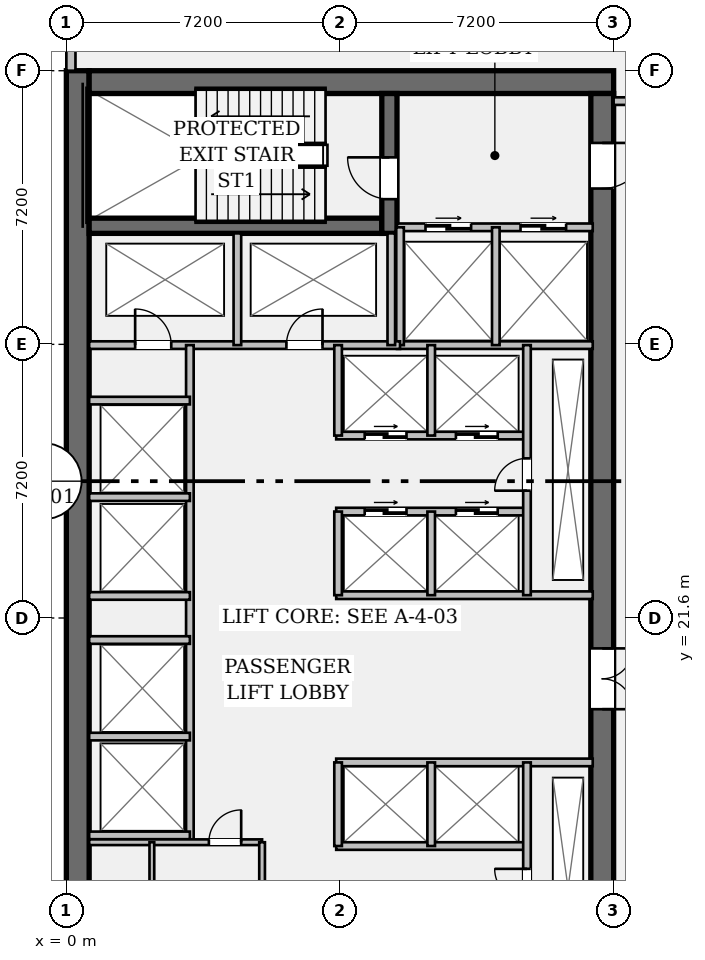
"""IFC4 building model, lengths in metres.
Left out: names, types, materials, properties, quantities, classifications, styles, units other than length and angle.
Written with IfcOpenShell. Run it as: python <this file> out.ifc"""

import sys

from ifc_helpers import new_model, si_unit, direction, frame, frame_2d, origin, place, context, subcontext, project, spatial, rectangle, extrude, element, fill, save


model = new_model("IFC4")
c1 = context("Model", 3, precision=1e-05, world=origin(), true_north=direction((0.0, 1.0)))
c2 = subcontext(c1, "Body", "Model", "MODEL_VIEW")
j1 = project(units=[si_unit("LENGTHUNIT", "METRE"), si_unit("PLANEANGLEUNIT", "RADIAN")], contexts=[c1])
p1 = place(None, origin())
s1 = spatial("IfcSite", under=j1, at=p1, CompositionType="ELEMENT")
p2 = place(p1, origin())
s2 = spatial("IfcBuilding", under=s1, at=p2, CompositionType="ELEMENT")
p3 = place(p2, frame((0.0, 0.0, 26.25)))
s3 = spatial("IfcBuildingStorey", under=s2, at=p3, CompositionType="ELEMENT", Elevation=26.25)
p4 = place(p3, frame((0.3, 7.2, 0.0), z_axis=(0.0, 0.0, 1.0), x_axis=(0.0, 1.0, 0.0)))
e1 = element("IfcWall", 1, at=p4, inside=s3, PredefinedType="SHEAR", context=c2, shape_type="SweptSolid", body=[
    extrude(rectangle(XDim=28.8, YDim=0.6, at=frame_2d((14.4, 0.0))), origin(), (0.0, 0.0, 1.0), 4.62),
])
p5 = place(p3, frame((0.6, 35.7, 0.0), z_axis=(0.0, 0.0, 1.0), x_axis=(1.0, 0.0, 0.0)))
e2 = element("IfcWall", 2, at=p5, inside=s3, PredefinedType="SHEAR", context=c2, shape_type="SweptSolid", body=[
    extrude(rectangle(XDim=13.8, YDim=0.6, at=frame_2d((6.9, 0.0))), origin(), (0.0, 0.0, 1.0), 4.62),
])
p6 = place(p3, frame((14.1, 35.4, 0.0), z_axis=(0.0, 0.0, 1.0), x_axis=(0.0, -1.0, 0.0)))
e3 = element("IfcWall", 3, at=p6, inside=s3, PredefinedType="SHEAR", context=c2, shape_type="SweptSolid", body=[
    extrude(rectangle(XDim=27.6, YDim=0.6, at=frame_2d((13.8, 0.0))), origin(), (0.0, 0.0, 1.0), 4.62),
])
p7 = place(p6, frame((1.3, 0.0, 0.0)))
e4 = element("IfcOpeningElement", 4, at=p7, cuts=e3, PredefinedType="OPENING", context=c2, shape_type="SweptSolid", body=[
    extrude(rectangle(XDim=1.2, YDim=2.15, at=frame_2d((0.6, 1.075))), frame((0.0, 0.312, 0.0), z_axis=(0.0, -1.0, 0.0), x_axis=(1.0, 0.0, 0.0)), (0.0, 0.0, 1.0), 0.624),
])
p8 = place(p6, frame((25.25, 0.0, 0.0)))
e5 = element("IfcOpeningElement", 5, at=p8, cuts=e3, PredefinedType="OPENING", context=c2, shape_type="SweptSolid", body=[
    extrude(rectangle(XDim=1.2, YDim=2.15, at=frame_2d((0.6, 1.075))), frame((0.0, 0.312, 0.0), z_axis=(0.0, -1.0, 0.0), x_axis=(1.0, 0.0, 0.0)), (0.0, 0.0, 1.0), 0.624),
])
p9 = place(p6, frame((14.6, 0.0, 0.0)))
e6 = element("IfcOpeningElement", 6, at=p9, cuts=e3, PredefinedType="OPENING", context=c2, shape_type="SweptSolid", body=[
    extrude(rectangle(XDim=1.6, YDim=2.2, at=frame_2d((0.8, 1.1))), frame((0.0, 0.312, 0.0), z_axis=(0.0, -1.0, 0.0), x_axis=(1.0, 0.0, 0.0)), (0.0, 0.0, 1.0), 0.624),
])
p10 = place(p3, frame((0.6, 31.92, 0.0), z_axis=(0.0, 0.0, 1.0), x_axis=(1.0, 0.0, 0.0)))
e7 = element("IfcWall", 7, at=p10, inside=s3, PredefinedType="SHEAR", context=c2, shape_type="SweptSolid", body=[
    extrude(rectangle(XDim=7.7, YDim=0.4, at=frame_2d((3.85, 0.0))), origin(), (0.0, 0.0, 1.0), 4.62),
])
p11 = place(p3, frame((8.5, 31.72, 0.0), z_axis=(0.0, 0.0, 1.0), x_axis=(0.0, 1.0, 0.0)))
e8 = element("IfcWall", 8, at=p11, inside=s3, PredefinedType="SHEAR", context=c2, shape_type="SweptSolid", body=[
    extrude(rectangle(XDim=3.68, YDim=0.4, at=frame_2d((1.84, 0.0))), origin(), (0.0, 0.0, 1.0), 4.62),
])
p12 = place(p11, frame((0.9, 0.0, 0.0)))
e9 = element("IfcOpeningElement", 9, at=p12, cuts=e8, PredefinedType="OPENING", context=c2, shape_type="SweptSolid", body=[
    extrude(rectangle(XDim=1.1, YDim=2.15, at=frame_2d((0.55, 1.075))), frame((0.0, 0.212, 0.0), z_axis=(0.0, -1.0, 0.0), x_axis=(1.0, 0.0, 0.0)), (0.0, 0.0, 1.0), 0.424),
])
p13 = place(p3, frame((0.12, 36.0, 0.0), z_axis=(0.0, 0.0, 1.0), x_axis=(0.0, 1.0, 0.0)))
e10 = element("IfcWall", 10, at=p13, inside=s3, PredefinedType="STANDARD", context=c2, shape_type="SweptSolid", body=[
    extrude(rectangle(XDim=4.38, YDim=0.24, at=frame_2d((2.19, 0.0))), origin(), (0.0, 0.0, 1.0), 4.62),
])
p14 = place(p3, frame((8.7, 31.88, 0.0), z_axis=(0.0, 0.0, 1.0), x_axis=(1.0, 0.0, 0.0)))
e11 = element("IfcWall", 11, at=p14, inside=s3, PredefinedType="PARTITIONING", context=c2, shape_type="SweptSolid", body=[
    extrude(rectangle(XDim=5.15, YDim=0.2, at=frame_2d((2.575, 0.0))), origin(), (0.0, 0.0, 1.0), 4.62),
])
p15 = place(p14, frame((0.75, 0.0, 0.0)))
e12 = element("IfcOpeningElement", 12, at=p15, cuts=e11, PredefinedType="OPENING", context=c2, shape_type="SweptSolid", body=[
    extrude(rectangle(XDim=1.2, YDim=2.2, at=frame_2d((0.6, 1.1))), frame((0.0, 0.112, 0.0), z_axis=(0.0, -1.0, 0.0), x_axis=(1.0, 0.0, 0.0)), (0.0, 0.0, 1.0), 0.224),
])
p16 = place(p14, frame((3.25, 0.0, 0.0)))
e13 = element("IfcOpeningElement", 13, at=p16, cuts=e11, PredefinedType="OPENING", context=c2, shape_type="SweptSolid", body=[
    extrude(rectangle(XDim=1.2, YDim=2.2, at=frame_2d((0.6, 1.1))), frame((0.0, 0.112, 0.0), z_axis=(0.0, -1.0, 0.0), x_axis=(1.0, 0.0, 0.0)), (0.0, 0.0, 1.0), 0.224),
])
p17 = place(p3, frame((8.7, 28.78, 0.0), z_axis=(0.0, 0.0, 1.0), x_axis=(1.0, 0.0, 0.0)))
e14 = element("IfcWall", 14, at=p17, inside=s3, PredefinedType="PARTITIONING", context=c2, shape_type="SweptSolid", body=[
    extrude(rectangle(XDim=5.15, YDim=0.2, at=frame_2d((2.575, 0.0))), origin(), (0.0, 0.0, 1.0), 4.62),
])
for number, where, z_axis, x_axis in (
    (15, (8.78, 28.78, 0.0), (0.0, 0.0, 1.0), (0.0, 1.0, 0.0)),
    (16, (11.3, 28.78, 0.0), (0.0, 0.0, 1.0), (0.0, 1.0, 0.0)),
):
    element("IfcWall", number, at=place(p3, frame(where, z_axis=z_axis, x_axis=x_axis)), inside=s3, PredefinedType="PARTITIONING", context=c2, shape_type="SweptSolid", body=[
        extrude(rectangle(XDim=3.1, YDim=0.2, at=frame_2d((1.55, 0.0))), origin(), (0.0, 0.0, 1.0), 4.62),
    ])
p18 = place(p3, frame((0.6, 28.78, 0.0), z_axis=(0.0, 0.0, 1.0), x_axis=(1.0, 0.0, 0.0)))
e17 = element("IfcWall", 17, at=p18, inside=s3, PredefinedType="PARTITIONING", context=c2, shape_type="SweptSolid", body=[
    extrude(rectangle(XDim=8.18, YDim=0.2, at=frame_2d((4.09, 0.0))), origin(), (0.0, 0.0, 1.0), 4.62),
])
p19 = place(p18, frame((1.21, 0.0, 0.0)))
e18 = element("IfcOpeningElement", 18, at=p19, cuts=e17, PredefinedType="OPENING", context=c2, shape_type="SweptSolid", body=[
    extrude(rectangle(XDim=0.95, YDim=2.15, at=frame_2d((0.475, 1.075))), frame((0.0, 0.112, 0.0), z_axis=(0.0, -1.0, 0.0), x_axis=(1.0, 0.0, 0.0)), (0.0, 0.0, 1.0), 0.224),
])
p20 = place(p18, frame((5.19, 0.0, 0.0)))
e19 = element("IfcOpeningElement", 19, at=p20, cuts=e17, PredefinedType="OPENING", context=c2, shape_type="SweptSolid", body=[
    extrude(rectangle(XDim=0.95, YDim=2.15, at=frame_2d((0.475, 1.075))), frame((0.0, 0.112, 0.0), z_axis=(0.0, -1.0, 0.0), x_axis=(1.0, 0.0, 0.0)), (0.0, 0.0, 1.0), 0.224),
])
for number, where, z_axis, x_axis in (
    (20, (4.5, 28.78, 0.0), (0.0, 0.0, 1.0), (0.0, 1.0, 0.0)),
    (21, (8.55, 28.78, 0.0), (0.0, 0.0, 1.0), (0.0, 1.0, 0.0)),
):
    element("IfcWall", number, at=place(p3, frame(where, z_axis=z_axis, x_axis=x_axis)), inside=s3, PredefinedType="PARTITIONING", context=c2, shape_type="SweptSolid", body=[
        extrude(rectangle(XDim=2.94, YDim=0.2, at=frame_2d((1.47, 0.0))), origin(), (0.0, 0.0, 1.0), 4.62),
    ])
p21 = place(p3, frame((3.25, 15.7, 0.0), z_axis=(0.0, 0.0, 1.0), x_axis=(0.0, 1.0, 0.0)))
e22 = element("IfcWall", 22, at=p21, inside=s3, PredefinedType="PARTITIONING", context=c2, shape_type="SweptSolid", body=[
    extrude(rectangle(XDim=13.08, YDim=0.2, at=frame_2d((6.54, 0.0))), origin(), (0.0, 0.0, 1.0), 4.62),
])
for number, where, z_axis, x_axis in (
    (23, (0.6, 15.88, 0.0), (0.0, 0.0, 1.0), (1.0, 0.0, 0.0)),
    (24, (0.6, 18.48, 0.0), (0.0, 0.0, 1.0), (1.0, 0.0, 0.0)),
    (25, (0.6, 22.18, 0.0), (0.0, 0.0, 1.0), (1.0, 0.0, 0.0)),
    (26, (0.6, 24.78, 0.0), (0.0, 0.0, 1.0), (1.0, 0.0, 0.0)),
    (27, (0.6, 21.02, 0.0), (0.0, 0.0, 1.0), (1.0, 0.0, 0.0)),
    (28, (0.6, 27.32, 0.0), (0.0, 0.0, 1.0), (1.0, 0.0, 0.0)),
):
    element("IfcWall", number, at=place(p3, frame(where, z_axis=z_axis, x_axis=x_axis)), inside=s3, PredefinedType="PARTITIONING", context=c2, shape_type="SweptSolid", body=[
        extrude(rectangle(XDim=2.65, YDim=0.2, at=frame_2d((1.325, 0.0))), origin(), (0.0, 0.0, 1.0), 4.62),
    ])
p22 = place(p3, frame((7.1, 22.2, 0.0), z_axis=(0.0, 0.0, 1.0), x_axis=(1.0, 0.0, 0.0)))
e29 = element("IfcWall", 29, at=p22, inside=s3, PredefinedType="PARTITIONING", context=c2, shape_type="SweptSolid", body=[
    extrude(rectangle(XDim=6.75, YDim=0.2, at=frame_2d((3.375, 0.0))), origin(), (0.0, 0.0, 1.0), 4.62),
])
p23 = place(p3, frame((7.1, 24.4, 0.0), z_axis=(0.0, 0.0, 1.0), x_axis=(1.0, 0.0, 0.0)))
e30 = element("IfcWall", 30, at=p23, inside=s3, PredefinedType="PARTITIONING", context=c2, shape_type="SweptSolid", body=[
    extrude(rectangle(XDim=5.02, YDim=0.2, at=frame_2d((2.51, 0.0))), origin(), (0.0, 0.0, 1.0), 4.62),
])
p24 = place(p23, frame((0.75, 0.0, 0.0)))
e31 = element("IfcOpeningElement", 31, at=p24, cuts=e30, PredefinedType="OPENING", context=c2, shape_type="SweptSolid", body=[
    extrude(rectangle(XDim=1.1, YDim=2.2, at=frame_2d((0.55, 1.1))), frame((0.0, 0.112, 0.0), z_axis=(0.0, -1.0, 0.0), x_axis=(1.0, 0.0, 0.0)), (0.0, 0.0, 1.0), 0.224),
])
p25 = place(p23, frame((3.15, 0.0, 0.0)))
e32 = element("IfcOpeningElement", 32, at=p25, cuts=e30, PredefinedType="OPENING", context=c2, shape_type="SweptSolid", body=[
    extrude(rectangle(XDim=1.1, YDim=2.2, at=frame_2d((0.55, 1.1))), frame((0.0, 0.112, 0.0), z_axis=(0.0, -1.0, 0.0), x_axis=(1.0, 0.0, 0.0)), (0.0, 0.0, 1.0), 0.224),
])
p26 = place(p3, frame((7.1, 26.4, 0.0), z_axis=(0.0, 0.0, 1.0), x_axis=(1.0, 0.0, 0.0)))
e33 = element("IfcWall", 33, at=p26, inside=s3, PredefinedType="PARTITIONING", context=c2, shape_type="SweptSolid", body=[
    extrude(rectangle(XDim=5.02, YDim=0.2, at=frame_2d((2.51, 0.0))), origin(), (0.0, 0.0, 1.0), 4.62),
])
p27 = place(p26, frame((0.75, 0.0, 0.0)))
e34 = element("IfcOpeningElement", 34, at=p27, cuts=e33, PredefinedType="OPENING", context=c2, shape_type="SweptSolid", body=[
    extrude(rectangle(XDim=1.1, YDim=2.2, at=frame_2d((0.55, 1.1))), frame((0.0, 0.112, 0.0), z_axis=(0.0, -1.0, 0.0), x_axis=(1.0, 0.0, 0.0)), (0.0, 0.0, 1.0), 0.224),
])
p28 = place(p26, frame((3.15, 0.0, 0.0)))
e35 = element("IfcOpeningElement", 35, at=p28, cuts=e33, PredefinedType="OPENING", context=c2, shape_type="SweptSolid", body=[
    extrude(rectangle(XDim=1.1, YDim=2.2, at=frame_2d((0.55, 1.1))), frame((0.0, 0.112, 0.0), z_axis=(0.0, -1.0, 0.0), x_axis=(1.0, 0.0, 0.0)), (0.0, 0.0, 1.0), 0.224),
])
p29 = place(p3, frame((7.15, 22.2, 0.0), z_axis=(0.0, 0.0, 1.0), x_axis=(0.0, 1.0, 0.0)))
e36 = element("IfcWall", 36, at=p29, inside=s3, PredefinedType="PARTITIONING", context=c2, shape_type="SweptSolid", body=[
    extrude(rectangle(XDim=2.2, YDim=0.2, at=frame_2d((1.1, 0.0))), origin(), (0.0, 0.0, 1.0), 4.62),
])
p30 = place(p3, frame((7.15, 26.4, 0.0), z_axis=(0.0, 0.0, 1.0), x_axis=(0.0, 1.0, 0.0)))
e37 = element("IfcWall", 37, at=p30, inside=s3, PredefinedType="PARTITIONING", context=c2, shape_type="SweptSolid", body=[
    extrude(rectangle(XDim=2.38, YDim=0.2, at=frame_2d((1.19, 0.0))), origin(), (0.0, 0.0, 1.0), 4.62),
])
p31 = place(p3, frame((9.6, 22.2, 0.0), z_axis=(0.0, 0.0, 1.0), x_axis=(0.0, 1.0, 0.0)))
e38 = element("IfcWall", 38, at=p31, inside=s3, PredefinedType="PARTITIONING", context=c2, shape_type="SweptSolid", body=[
    extrude(rectangle(XDim=2.2, YDim=0.2, at=frame_2d((1.1, 0.0))), origin(), (0.0, 0.0, 1.0), 4.62),
])
p32 = place(p3, frame((9.6, 26.4, 0.0), z_axis=(0.0, 0.0, 1.0), x_axis=(0.0, 1.0, 0.0)))
e39 = element("IfcWall", 39, at=p32, inside=s3, PredefinedType="PARTITIONING", context=c2, shape_type="SweptSolid", body=[
    extrude(rectangle(XDim=2.38, YDim=0.2, at=frame_2d((1.19, 0.0))), origin(), (0.0, 0.0, 1.0), 4.62),
])
p33 = place(p3, frame((12.12, 22.2, 0.0), z_axis=(0.0, 0.0, 1.0), x_axis=(0.0, 1.0, 0.0)))
e40 = element("IfcWall", 40, at=p33, inside=s3, PredefinedType="PARTITIONING", context=c2, shape_type="SweptSolid", body=[
    extrude(rectangle(XDim=6.58, YDim=0.2, at=frame_2d((3.29, 0.0))), origin(), (0.0, 0.0, 1.0), 4.62),
])
p34 = place(p33, frame((2.75, 0.0, 0.0)))
e41 = element("IfcOpeningElement", 41, at=p34, cuts=e40, PredefinedType="OPENING", context=c2, shape_type="SweptSolid", body=[
    extrude(rectangle(XDim=0.85, YDim=2.15, at=frame_2d((0.425, 1.075))), frame((0.0, 0.112, 0.0), z_axis=(0.0, -1.0, 0.0), x_axis=(1.0, 0.0, 0.0)), (0.0, 0.0, 1.0), 0.224),
])
p35 = place(p3, frame((7.1, 17.8, 0.0), z_axis=(0.0, 0.0, 1.0), x_axis=(1.0, 0.0, 0.0)))
e42 = element("IfcWall", 42, at=p35, inside=s3, PredefinedType="PARTITIONING", context=c2, shape_type="SweptSolid", body=[
    extrude(rectangle(XDim=6.75, YDim=0.2, at=frame_2d((3.375, 0.0))), origin(), (0.0, 0.0, 1.0), 4.62),
])
p36 = place(p3, frame((7.1, 15.6, 0.0), z_axis=(0.0, 0.0, 1.0), x_axis=(1.0, 0.0, 0.0)))
e43 = element("IfcWall", 43, at=p36, inside=s3, PredefinedType="PARTITIONING", context=c2, shape_type="SweptSolid", body=[
    extrude(rectangle(XDim=5.02, YDim=0.2, at=frame_2d((2.51, 0.0))), origin(), (0.0, 0.0, 1.0), 4.62),
])
for number, where, z_axis, x_axis in (
    (44, (7.15, 15.6, 0.0), (0.0, 0.0, 1.0), (0.0, 1.0, 0.0)),
    (45, (9.6, 15.6, 0.0), (0.0, 0.0, 1.0), (0.0, 1.0, 0.0)),
):
    element("IfcWall", number, at=place(p3, frame(where, z_axis=z_axis, x_axis=x_axis)), inside=s3, PredefinedType="PARTITIONING", context=c2, shape_type="SweptSolid", body=[
        extrude(rectangle(XDim=2.2, YDim=0.2, at=frame_2d((1.1, 0.0))), origin(), (0.0, 0.0, 1.0), 4.62),
    ])
p37 = place(p3, frame((12.12, 11.2, 0.0), z_axis=(0.0, 0.0, 1.0), x_axis=(0.0, 1.0, 0.0)))
e46 = element("IfcWall", 46, at=p37, inside=s3, PredefinedType="PARTITIONING", context=c2, shape_type="SweptSolid", body=[
    extrude(rectangle(XDim=6.6, YDim=0.2, at=frame_2d((3.3, 0.0))), origin(), (0.0, 0.0, 1.0), 4.62),
])
p38 = place(p37, frame((2.95, 0.0, 0.0)))
e47 = element("IfcOpeningElement", 47, at=p38, cuts=e46, PredefinedType="OPENING", context=c2, shape_type="SweptSolid", body=[
    extrude(rectangle(XDim=0.85, YDim=2.15, at=frame_2d((0.425, 1.075))), frame((0.0, 0.112, 0.0), z_axis=(0.0, -1.0, 0.0), x_axis=(1.0, 0.0, 0.0)), (0.0, 0.0, 1.0), 0.224),
])
p39 = place(p3, frame((0.6, 15.7, 0.0), z_axis=(0.0, 0.0, 1.0), x_axis=(1.0, 0.0, 0.0)))
e48 = element("IfcWall", 48, at=p39, inside=s3, PredefinedType="PARTITIONING", context=c2, shape_type="SweptSolid", body=[
    extrude(rectangle(XDim=4.55, YDim=0.15, at=frame_2d((2.275, 0.0))), origin(), (0.0, 0.0, 1.0), 4.62),
])
p40 = place(p39, frame((3.15, 0.0, 0.0)))
e49 = element("IfcOpeningElement", 49, at=p40, cuts=e48, PredefinedType="OPENING", context=c2, shape_type="SweptSolid", body=[
    extrude(rectangle(XDim=0.85, YDim=2.15, at=frame_2d((0.425, 1.075))), frame((0.0, 0.087, 0.0), z_axis=(0.0, -1.0, 0.0), x_axis=(1.0, 0.0, 0.0)), (0.0, 0.0, 1.0), 0.174),
])
p41 = place(p3, frame((5.15, 11.28, 0.0), z_axis=(0.0, 0.0, 1.0), x_axis=(0.0, 1.0, 0.0)))
e50 = element("IfcWall", 50, at=p41, inside=s3, PredefinedType="PARTITIONING", context=c2, shape_type="SweptSolid", body=[
    extrude(rectangle(XDim=4.42, YDim=0.15, at=frame_2d((2.21, 0.0))), origin(), (0.0, 0.0, 1.0), 4.62),
])
p42 = place(p3, frame((2.25, 11.28, 0.0), z_axis=(0.0, 0.0, 1.0), x_axis=(0.0, 1.0, 0.0)))
e51 = element("IfcWall", 51, at=p42, inside=s3, PredefinedType="PARTITIONING", context=c2, shape_type="SweptSolid", body=[
    extrude(rectangle(XDim=4.42, YDim=0.125, at=frame_2d((2.21, 0.0))), origin(), (0.0, 0.0, 1.0), 4.62),
])
p43 = place(p42, frame((1.65, 0.0, 0.0)))
e52 = element("IfcOpeningElement", 52, at=p43, cuts=e51, PredefinedType="OPENING", context=c2, shape_type="SweptSolid", body=[
    extrude(rectangle(XDim=0.85, YDim=2.15, at=frame_2d((0.425, 1.075))), frame((0.0, 0.074, 0.0), z_axis=(0.0, -1.0, 0.0), x_axis=(1.0, 0.0, 0.0)), (0.0, 0.0, 1.0), 0.149),
])
p44 = place(p3, frame((14.4, 35.2, 0.0), z_axis=(0.0, 0.0, 1.0), x_axis=(1.0, 0.0, 0.0)))
e53 = element("IfcWall", 53, at=p44, inside=s3, PredefinedType="PARTITIONING", context=c2, shape_type="SweptSolid", body=[
    extrude(rectangle(XDim=2.95, YDim=0.2, at=frame_2d((1.475, 0.0))), origin(), (0.0, 0.0, 1.0), 3.678),
])
p45 = place(p44, frame((0.9, 0.0, 0.0)))
e54 = element("IfcOpeningElement", 54, at=p45, cuts=e53, PredefinedType="OPENING", context=c2, shape_type="SweptSolid", body=[
    extrude(rectangle(XDim=1.0, YDim=2.15, at=frame_2d((0.5, 1.075))), frame((0.0, 0.112, 0.0), z_axis=(0.0, -1.0, 0.0), x_axis=(1.0, 0.0, 0.0)), (0.0, 0.0, 1.0), 0.224),
])
p46 = place(p12, origin())
e55 = element("IfcDoor", 55, at=p46, inside=s3, OperationType="SINGLE_SWING_RIGHT", PredefinedType="DOOR", context=c2, shape_type="SweptSolid", body=[
    extrude(rectangle(XDim=1.1, YDim=2.15, at=frame_2d((0.55, 1.075))), frame((0.0, 0.025, 0.0), z_axis=(0.0, -1.0, 0.0), x_axis=(1.0, 0.0, 0.0)), (0.0, 0.0, 1.0), 0.05),
])
fill(e9, e55)
p47 = place(p7, origin())
e56 = element("IfcDoor", 56, at=p47, inside=s3, OperationType="SINGLE_SWING_LEFT", PredefinedType="DOOR", context=c2, shape_type="SweptSolid", body=[
    extrude(rectangle(XDim=1.2, YDim=2.15, at=frame_2d((0.6, 1.075))), frame((0.0, 0.025, 0.0), z_axis=(0.0, -1.0, 0.0), x_axis=(1.0, 0.0, 0.0)), (0.0, 0.0, 1.0), 0.05),
])
fill(e4, e56)
p48 = place(p15, origin())
e57 = element("IfcDoor", 57, at=p48, inside=s3, OperationType="DOUBLE_DOOR_SLIDING", PredefinedType="DOOR", context=c2, shape_type="SweptSolid", body=[
    extrude(rectangle(XDim=1.2, YDim=2.2, at=frame_2d((0.6, 1.1))), frame((0.0, 0.025, 0.0), z_axis=(0.0, -1.0, 0.0), x_axis=(1.0, 0.0, 0.0)), (0.0, 0.0, 1.0), 0.05),
])
fill(e12, e57)
p49 = place(p16, origin())
e58 = element("IfcDoor", 58, at=p49, inside=s3, OperationType="DOUBLE_DOOR_SLIDING", PredefinedType="DOOR", context=c2, shape_type="SweptSolid", body=[
    extrude(rectangle(XDim=1.2, YDim=2.2, at=frame_2d((0.6, 1.1))), frame((0.0, 0.025, 0.0), z_axis=(0.0, -1.0, 0.0), x_axis=(1.0, 0.0, 0.0)), (0.0, 0.0, 1.0), 0.05),
])
fill(e13, e58)
p50 = place(p19, origin())
e59 = element("IfcDoor", 59, at=p50, inside=s3, OperationType="SINGLE_SWING_LEFT", PredefinedType="DOOR", context=c2, shape_type="SweptSolid", body=[
    extrude(rectangle(XDim=0.95, YDim=2.15, at=frame_2d((0.475, 1.075))), frame((0.0, 0.025, 0.0), z_axis=(0.0, -1.0, 0.0), x_axis=(1.0, 0.0, 0.0)), (0.0, 0.0, 1.0), 0.05),
])
fill(e18, e59)
p51 = place(p20, origin())
e60 = element("IfcDoor", 60, at=p51, inside=s3, OperationType="SINGLE_SWING_RIGHT", PredefinedType="DOOR", context=c2, shape_type="SweptSolid", body=[
    extrude(rectangle(XDim=0.95, YDim=2.15, at=frame_2d((0.475, 1.075))), frame((0.0, 0.025, 0.0), z_axis=(0.0, -1.0, 0.0), x_axis=(1.0, 0.0, 0.0)), (0.0, 0.0, 1.0), 0.05),
])
fill(e19, e60)
p52 = place(p9, origin())
e61 = element("IfcDoor", 61, at=p52, inside=s3, OperationType="DOUBLE_DOOR_SINGLE_SWING", PredefinedType="DOOR", context=c2, shape_type="SweptSolid", body=[
    extrude(rectangle(XDim=1.6, YDim=2.2, at=frame_2d((0.8, 1.1))), frame((0.0, 0.025, 0.0), z_axis=(0.0, -1.0, 0.0), x_axis=(1.0, 0.0, 0.0)), (0.0, 0.0, 1.0), 0.05),
])
fill(e6, e61)
p53 = place(p34, origin())
e62 = element("IfcDoor", 62, at=p53, inside=s3, OperationType="SINGLE_SWING_LEFT", PredefinedType="DOOR", context=c2, shape_type="SweptSolid", body=[
    extrude(rectangle(XDim=0.85, YDim=2.15, at=frame_2d((0.425, 1.075))), frame((0.0, 0.025, 0.0), z_axis=(0.0, -1.0, 0.0), x_axis=(1.0, 0.0, 0.0)), (0.0, 0.0, 1.0), 0.05),
])
fill(e41, e62)
p54 = place(p24, origin())
e63 = element("IfcDoor", 63, at=p54, inside=s3, OperationType="DOUBLE_DOOR_SLIDING", PredefinedType="DOOR", context=c2, shape_type="SweptSolid", body=[
    extrude(rectangle(XDim=1.1, YDim=2.2, at=frame_2d((0.55, 1.1))), frame((0.0, 0.025, 0.0), z_axis=(0.0, -1.0, 0.0), x_axis=(1.0, 0.0, 0.0)), (0.0, 0.0, 1.0), 0.05),
])
fill(e31, e63)
p55 = place(p25, origin())
e64 = element("IfcDoor", 64, at=p55, inside=s3, OperationType="DOUBLE_DOOR_SLIDING", PredefinedType="DOOR", context=c2, shape_type="SweptSolid", body=[
    extrude(rectangle(XDim=1.1, YDim=2.2, at=frame_2d((0.55, 1.1))), frame((0.0, 0.025, 0.0), z_axis=(0.0, -1.0, 0.0), x_axis=(1.0, 0.0, 0.0)), (0.0, 0.0, 1.0), 0.05),
])
fill(e32, e64)
p56 = place(p27, origin())
e65 = element("IfcDoor", 65, at=p56, inside=s3, OperationType="DOUBLE_DOOR_SLIDING", PredefinedType="DOOR", context=c2, shape_type="SweptSolid", body=[
    extrude(rectangle(XDim=1.1, YDim=2.2, at=frame_2d((0.55, 1.1))), frame((0.0, 0.025, 0.0), z_axis=(0.0, -1.0, 0.0), x_axis=(1.0, 0.0, 0.0)), (0.0, 0.0, 1.0), 0.05),
])
fill(e34, e65)
p57 = place(p28, origin())
e66 = element("IfcDoor", 66, at=p57, inside=s3, OperationType="DOUBLE_DOOR_SLIDING", PredefinedType="DOOR", context=c2, shape_type="SweptSolid", body=[
    extrude(rectangle(XDim=1.1, YDim=2.2, at=frame_2d((0.55, 1.1))), frame((0.0, 0.025, 0.0), z_axis=(0.0, -1.0, 0.0), x_axis=(1.0, 0.0, 0.0)), (0.0, 0.0, 1.0), 0.05),
])
fill(e35, e66)
p58 = place(p38, origin())
e67 = element("IfcDoor", 67, at=p58, inside=s3, OperationType="SINGLE_SWING_RIGHT", PredefinedType="DOOR", context=c2, shape_type="SweptSolid", body=[
    extrude(rectangle(XDim=0.85, YDim=2.15, at=frame_2d((0.425, 1.075))), frame((0.0, 0.025, 0.0), z_axis=(0.0, -1.0, 0.0), x_axis=(1.0, 0.0, 0.0)), (0.0, 0.0, 1.0), 0.05),
])
fill(e47, e67)
p59 = place(p40, origin())
e68 = element("IfcDoor", 68, at=p59, inside=s3, OperationType="SINGLE_SWING_RIGHT", PredefinedType="DOOR", context=c2, shape_type="SweptSolid", body=[
    extrude(rectangle(XDim=0.85, YDim=2.15, at=frame_2d((0.425, 1.075))), frame((0.0, 0.025, 0.0), z_axis=(0.0, -1.0, 0.0), x_axis=(1.0, 0.0, 0.0)), (0.0, 0.0, 1.0), 0.05),
])
fill(e49, e68)
save(model, sys.argv[1])
